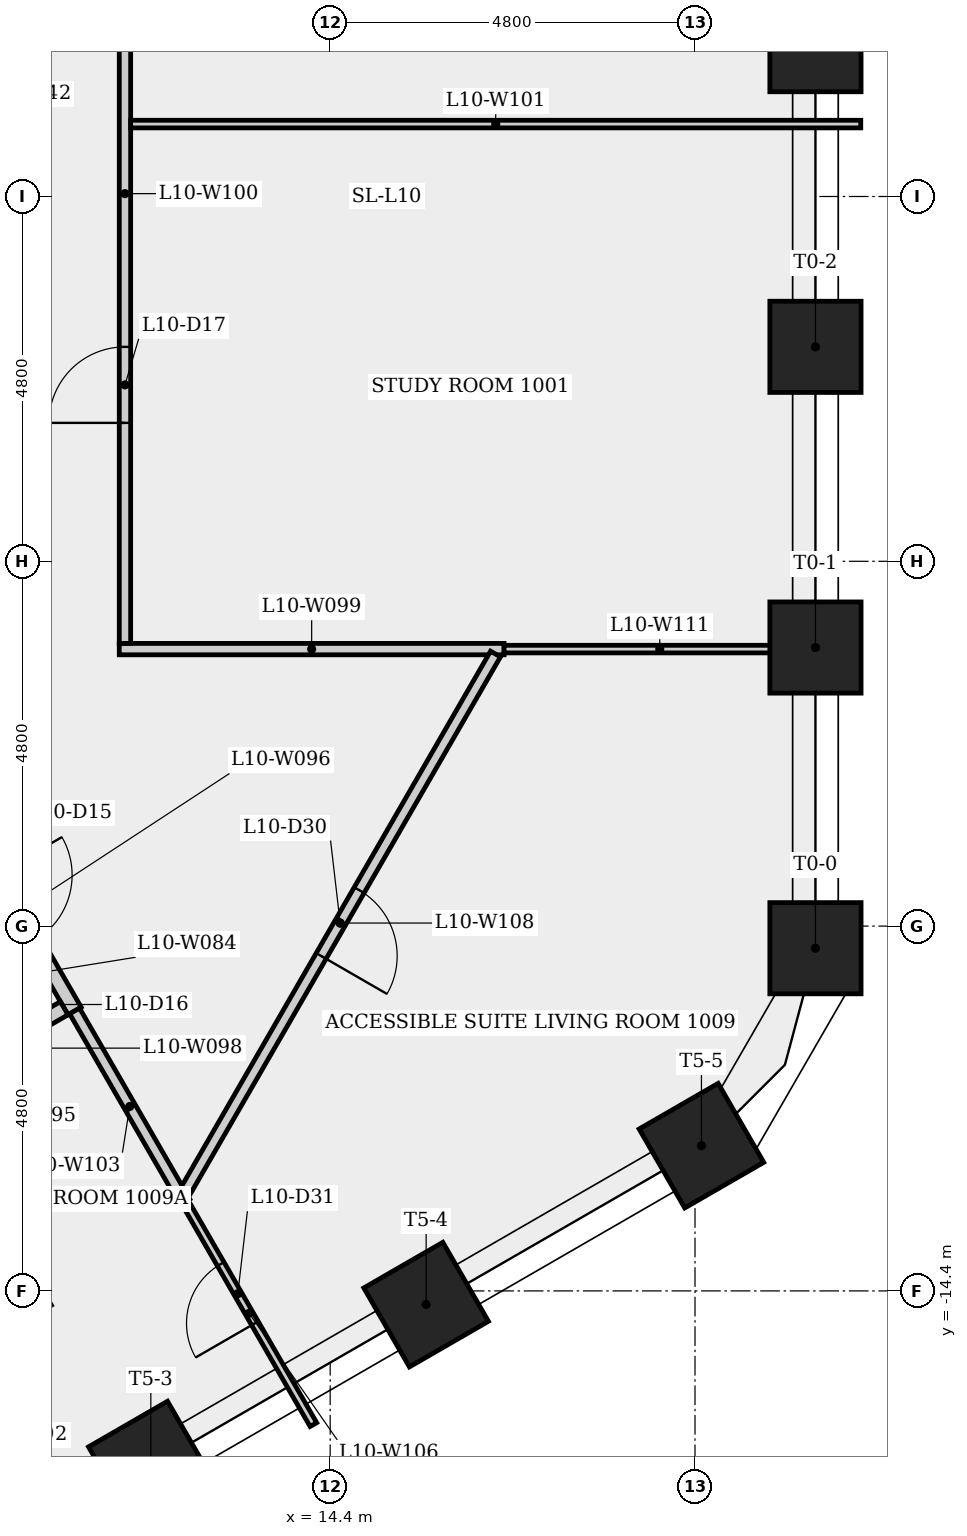
"""IFC4 building model, lengths in metres.
Left out: names, types, materials, properties, quantities, classifications, styles, units other than length and angle.
Written with IfcOpenShell. Run it as: python <this file> out.ifc"""

import sys

from ifc_helpers import new_model, si_unit, direction, frame, frame_2d, origin, origin_2d, place, context, subcontext, project, spatial, rectangle, extrude, element, fill, save


model = new_model("IFC4")
c1 = context("Model", 3, precision=1e-05, world=origin(), true_north=direction((0.0, 1.0)))
c2 = subcontext(c1, "Body", "Model", "MODEL_VIEW")
j1 = project(units=[si_unit("LENGTHUNIT", "METRE"), si_unit("PLANEANGLEUNIT", "RADIAN")], contexts=[c1])
p1 = place(None, origin())
s1 = spatial("IfcSite", under=j1, at=p1, CompositionType="ELEMENT")
p2 = place(p1, origin())
s2 = spatial("IfcBuilding", under=s1, at=p2, CompositionType="ELEMENT")
p3 = place(p2, frame((0.0, 0.0, 42.5)))
s3 = spatial("IfcBuildingStorey", under=s2, at=p3, CompositionType="ELEMENT", Elevation=42.5)
for number, where, z_axis, x_axis in (
    (1, (20.785, -9.891, 0.0), (0.0, 0.0, 1.0), (1.0, 0.0, 0.0)),
    (2, (20.785, -5.935, 0.0), (0.0, 0.0, 1.0), (1.0, 0.0, 0.0)),
    (3, (20.785, -1.978, 0.0), (0.0, 0.0, 1.0), (1.0, 0.0, 0.0)),
    (4, (20.785, 1.978, 0.0), (0.0, 0.0, 1.0), (1.0, 0.0, 0.0)),
    (5, (12.04, -16.672, 0.0), (0.0, 0.0, 1.0), (0.5, -0.866, 0.0)),
    (6, (15.662, -14.58, 0.0), (0.0, 0.0, 1.0), (0.5, -0.866, 0.0)),
    (7, (19.285, -12.489, 0.0), (0.0, 0.0, 1.0), (0.5, -0.866, 0.0)),
):
    element("IfcColumn", number, at=place(p3, frame(where, z_axis=z_axis, x_axis=x_axis)), inside=s3, PredefinedType="COLUMN", context=c2, shape_type="SweptSolid", body=[
        extrude(rectangle(XDim=1.2, YDim=1.2, at=origin_2d()), origin(), (0.0, 0.0, 1.0), 3.4),
    ])
p4 = place(p3, frame((9.537, -8.119, 0.0), z_axis=(0.0, 0.0, 1.0), x_axis=(0.499990139034, -0.866031096941, 0.0)))
e8 = element("IfcWall", 8, at=p4, inside=s3, PredefinedType="PARTITIONING", context=c2, shape_type="SweptSolid", body=[
    extrude(rectangle(XDim=3.0, YDim=0.2, at=frame_2d((1.5, 0.0))), origin(), (0.0, 0.0, 1.0), 3.05),
])
p5 = place(p4, frame((0.935, 0.0, 0.0)))
e9 = element("IfcOpeningElement", 9, at=p5, cuts=e8, PredefinedType="OPENING", context=c2, shape_type="SweptSolid", body=[
    extrude(rectangle(XDim=1.0, YDim=2.1, at=frame_2d((0.5, 1.05))), frame((0.0, 0.11, 0.0), z_axis=(0.0, -1.0, 0.0), x_axis=(1.0, 0.0, 0.0)), (0.0, 0.0, 1.0), 0.22),
])
p6 = place(p3, frame((10.901, -10.681, 0.0), z_axis=(0.0, 0.0, 1.0), x_axis=(-0.866009402589, -0.500027713859, 0.0)))
e10 = element("IfcWall", 10, at=p6, inside=s3, PredefinedType="PARTITIONING", context=c2, shape_type="SweptSolid", body=[
    extrude(rectangle(XDim=2.1, YDim=0.2, at=frame_2d((1.05, 0.0))), origin(), (0.0, 0.0, 1.0), 3.05),
])
p7 = place(p3, frame((11.625, -5.955, 0.0), z_axis=(0.0, 0.0, 1.0), x_axis=(1.0, 0.0, 0.0)))
e11 = element("IfcWall", 11, at=p7, inside=s3, PredefinedType="PARTITIONING", context=c2, shape_type="SweptSolid", body=[
    extrude(rectangle(XDim=5.063, YDim=0.15, at=frame_2d((2.531, 0.0))), origin(), (0.0, 0.0, 1.0), 3.05),
])
p8 = place(p3, frame((11.7, -5.88, 0.0), z_axis=(0.0, 0.0, 1.0), x_axis=(0.0, 1.0, 0.0)))
e12 = element("IfcWall", 12, at=p8, inside=s3, PredefinedType="PARTITIONING", context=c2, shape_type="SweptSolid", body=[
    extrude(rectangle(XDim=11.835, YDim=0.15, at=frame_2d((5.918, 0.0))), origin(), (0.0, 0.0, 1.0), 3.05),
])
p9 = place(p8, frame((2.902, 0.0, 0.0)))
e13 = element("IfcOpeningElement", 13, at=p9, cuts=e12, PredefinedType="OPENING", context=c2, shape_type="SweptSolid", body=[
    extrude(rectangle(XDim=1.0, YDim=2.1, at=frame_2d((0.5, 1.05))), frame((0.0, 0.085, 0.0), z_axis=(0.0, -1.0, 0.0), x_axis=(1.0, 0.0, 0.0)), (0.0, 0.0, 1.0), 0.17),
])
p10 = place(p3, frame((11.775, 0.953, 0.0), z_axis=(0.0, 0.0, 1.0), x_axis=(1.0, 0.0, 0.0)))
e14 = element("IfcWall", 14, at=p10, inside=s3, PredefinedType="PARTITIONING", context=c2, shape_type="SweptSolid", body=[
    extrude(rectangle(XDim=9.606, YDim=0.1, at=frame_2d((4.803, 0.0))), origin(), (0.0, 0.0, 1.0), 3.05),
])
p11 = place(p3, frame((12.488, -13.229, 0.0), z_axis=(0.0, 0.0, 1.0), x_axis=(-0.499967707918, 0.866044046824, 0.0)))
e15 = element("IfcWall", 15, at=p11, inside=s3, PredefinedType="PARTITIONING", context=c2, shape_type="SweptSolid", body=[
    extrude(rectangle(XDim=2.901, YDim=0.15, at=frame_2d((1.451, 0.0))), origin(), (0.0, 0.0, 1.0), 3.05),
])
p12 = place(p3, frame((14.179, -16.159, 0.0), z_axis=(0.0, 0.0, 1.0), x_axis=(-0.499988999718, 0.866031754707, 0.0)))
e16 = element("IfcWall", 16, at=p12, inside=s3, PredefinedType="PARTITIONING", context=c2, shape_type="SweptSolid", body=[
    extrude(rectangle(XDim=3.383, YDim=0.1, at=frame_2d((1.691, 0.0))), origin(), (0.0, 0.0, 1.0), 3.05),
])
p13 = place(p12, frame((1.539, 0.0, 0.0)))
e17 = element("IfcOpeningElement", 17, at=p13, cuts=e16, PredefinedType="OPENING", context=c2, shape_type="SweptSolid", body=[
    extrude(rectangle(XDim=0.9, YDim=2.1, at=frame_2d((0.45, 1.05))), frame((0.0, 0.06, 0.0), z_axis=(0.0, -1.0, 0.0), x_axis=(1.0, 0.0, 0.0)), (0.0, 0.0, 1.0), 0.12),
])
p14 = place(p3, frame((16.575, -6.02, 0.0), z_axis=(0.0, 0.0, 1.0), x_axis=(-0.49999993043, -0.86602544395, 0.0)))
e18 = element("IfcWall", 18, at=p14, inside=s3, PredefinedType="PARTITIONING", context=c2, shape_type="SweptSolid", body=[
    extrude(rectangle(XDim=8.175, YDim=0.15, at=frame_2d((4.087, 0.0))), origin(), (0.0, 0.0, 1.0), 3.05),
])
p15 = place(p14, frame((3.587, 0.0, 0.0)))
e19 = element("IfcOpeningElement", 19, at=p15, cuts=e18, PredefinedType="OPENING", context=c2, shape_type="SweptSolid", body=[
    extrude(rectangle(XDim=1.0, YDim=2.1, at=frame_2d((0.5, 1.05))), frame((0.0, 0.085, 0.0), z_axis=(0.0, -1.0, 0.0), x_axis=(1.0, 0.0, 0.0)), (0.0, 0.0, 1.0), 0.17),
])
p16 = place(p3, frame((20.785, -5.955, 0.0), z_axis=(0.0, 0.0, 1.0), x_axis=(-1.0, 0.0, 0.0)))
e20 = element("IfcWall", 20, at=p16, inside=s3, PredefinedType="PARTITIONING", context=c2, shape_type="SweptSolid", body=[
    extrude(rectangle(XDim=4.097, YDim=0.1, at=frame_2d((2.048, 0.0))), origin(), (0.0, 0.0, 1.0), 3.05),
])
p17 = place(p9, origin())
e21 = element("IfcDoor", 21, at=p17, inside=s3, OperationType="SINGLE_SWING_LEFT", PredefinedType="DOOR", context=c2, shape_type="SweptSolid", body=[
    extrude(rectangle(XDim=1.0, YDim=2.1, at=frame_2d((0.5, 1.05))), frame((0.0, 0.025, 0.0), z_axis=(0.0, -1.0, 0.0), x_axis=(1.0, 0.0, 0.0)), (0.0, 0.0, 1.0), 0.05),
])
fill(e13, e21)
p18 = place(p15, origin())
e22 = element("IfcDoor", 22, at=p18, inside=s3, OperationType="SINGLE_SWING_RIGHT", PredefinedType="DOOR", context=c2, shape_type="SweptSolid", body=[
    extrude(rectangle(XDim=1.0, YDim=2.1, at=frame_2d((0.5, 1.05))), frame((0.0, 0.025, 0.0), z_axis=(0.0, -1.0, 0.0), x_axis=(1.0, 0.0, 0.0)), (0.0, 0.0, 1.0), 0.05),
])
fill(e19, e22)
p19 = place(p13, origin())
e23 = element("IfcDoor", 23, at=p19, inside=s3, OperationType="SINGLE_SWING_LEFT", PredefinedType="DOOR", context=c2, shape_type="SweptSolid", body=[
    extrude(rectangle(XDim=0.9, YDim=2.1, at=frame_2d((0.45, 1.05))), frame((0.0, 0.025, 0.0), z_axis=(0.0, -1.0, 0.0), x_axis=(1.0, 0.0, 0.0)), (0.0, 0.0, 1.0), 0.05),
])
fill(e17, e23)
save(model, sys.argv[1])
